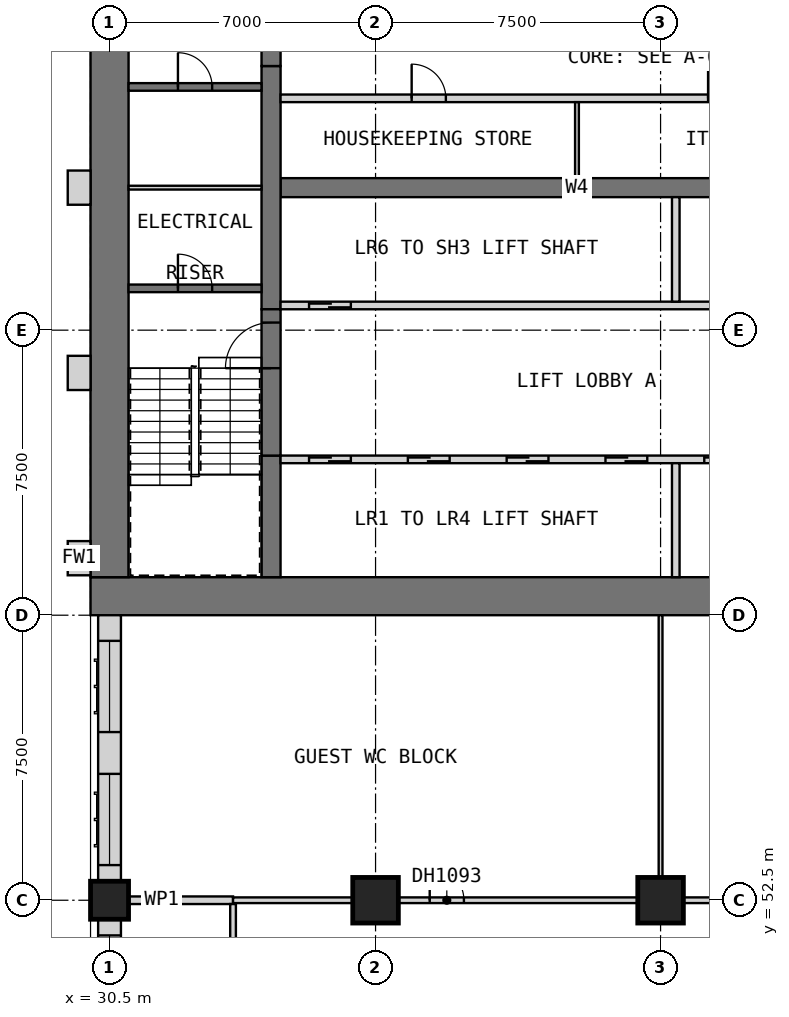
"""IFC4 building model, lengths in metres.
Left out: names, types, materials, properties, quantities, classifications, styles, units other than length and angle.
Written with IfcOpenShell. Run it as: python <this file> out.ifc"""

import sys

from ifc_helpers import new_model, si_unit, direction, frame, frame_2d, origin, origin_2d, place, context, subcontext, project, spatial, rectangle, extrude, element, fill, save


model = new_model("IFC4")
c1 = context("Model", 3, precision=1e-05, world=origin(), true_north=direction((0.0, 1.0)))
c2 = subcontext(c1, "Body", "Model", "MODEL_VIEW")
j1 = project(units=[si_unit("LENGTHUNIT", "METRE"), si_unit("PLANEANGLEUNIT", "RADIAN")], contexts=[c1])
p1 = place(None, origin())
s1 = spatial("IfcSite", under=j1, at=p1, CompositionType="ELEMENT")
p2 = place(p1, origin())
s2 = spatial("IfcBuilding", under=s1, at=p2, CompositionType="ELEMENT")
p3 = place(p2, frame((0.0, 0.0, 34.0)))
s3 = spatial("IfcBuildingStorey", under=s2, at=p3, CompositionType="ELEMENT", Elevation=34.0)
p4 = place(p3, frame((30.5, 52.5, 0.0), z_axis=(0.0, 0.0, 1.0), x_axis=(1.0, 0.0, 0.0)))
e1 = element("IfcColumn", 1, at=p4, inside=s3, PredefinedType="COLUMN", context=c2, shape_type="SweptSolid", body=[
    extrude(rectangle(XDim=1.0, YDim=1.0, at=origin_2d()), origin(), (0.0, 0.0, 1.0), 3.6),
])
for number, where, z_axis, x_axis in (
    (2, (37.5, 52.5, 0.0), (0.0, 0.0, 1.0), (1.0, 0.0, 0.0)),
    (3, (45.0, 52.5, 0.0), (0.0, 0.0, 1.0), (1.0, 0.0, 0.0)),
):
    element("IfcColumn", number, at=place(p3, frame(where, z_axis=z_axis, x_axis=x_axis)), inside=s3, PredefinedType="COLUMN", context=c2, shape_type="SweptSolid", body=[
        extrude(rectangle(XDim=1.2, YDim=1.2, at=origin_2d()), origin(), (0.0, 0.0, 1.0), 3.6),
    ])
p5 = place(p3, frame((30.0, 60.5, 0.0), z_axis=(0.0, 0.0, 1.0), x_axis=(1.0, 0.0, 0.0)))
e4 = element("IfcWall", 4, at=p5, inside=s3, PredefinedType="SHEAR", context=c2, shape_type="SweptSolid", body=[
    extrude(rectangle(XDim=30.0, YDim=1.0, at=frame_2d((15.0, 0.0))), origin(), (0.0, 0.0, 1.0), 3.6),
])
p6 = place(p5, frame((21.9, 0.0, 0.0)))
e5 = element("IfcOpeningElement", 5, at=p6, cuts=e4, PredefinedType="OPENING", context=c2, shape_type="SweptSolid", body=[
    extrude(rectangle(XDim=1.8, YDim=2.1, at=frame_2d((0.9, 1.05))), frame((0.0, 0.51, 0.0), z_axis=(0.0, -1.0, 0.0), x_axis=(1.0, 0.0, 0.0)), (0.0, 0.0, 1.0), 1.02),
])
p7 = place(p5, frame((26.5, 0.0, 0.0)))
e6 = element("IfcOpeningElement", 6, at=p7, cuts=e4, PredefinedType="OPENING", context=c2, shape_type="SweptSolid", body=[
    extrude(rectangle(XDim=1.2, YDim=2.1, at=frame_2d((0.6, 1.05))), frame((0.0, 0.51, 0.0), z_axis=(0.0, -1.0, 0.0), x_axis=(1.0, 0.0, 0.0)), (0.0, 0.0, 1.0), 1.02),
])
p8 = place(p3, frame((30.5, 61.0, 0.0), z_axis=(0.0, 0.0, 1.0), x_axis=(0.0, 1.0, 0.0)))
e7 = element("IfcWall", 7, at=p8, inside=s3, PredefinedType="SHEAR", context=c2, shape_type="SweptSolid", body=[
    extrude(rectangle(XDim=20.5, YDim=1.0, at=frame_2d((10.25, 0.0))), origin(), (0.0, 0.0, 1.0), 3.6),
])
p9 = place(p3, frame((35.0, 71.25, 0.0), z_axis=(0.0, 0.0, 1.0), x_axis=(1.0, 0.0, 0.0)))
e8 = element("IfcWall", 8, at=p9, inside=s3, PredefinedType="SHEAR", context=c2, shape_type="SweptSolid", body=[
    extrude(rectangle(XDim=15.6, YDim=0.5, at=frame_2d((7.8, 0.0))), origin(), (0.0, 0.0, 1.0), 3.6),
])
p10 = place(p3, frame((34.75, 61.0, 0.0), z_axis=(0.0, 0.0, 1.0), x_axis=(0.0, 1.0, 0.0)))
e9 = element("IfcWall", 9, at=p10, inside=s3, PredefinedType="SHEAR", context=c2, shape_type="SweptSolid", body=[
    extrude(rectangle(XDim=3.2, YDim=0.5, at=frame_2d((1.6, 0.0))), origin(), (0.0, 0.0, 1.0), 3.6),
])
p11 = place(p3, frame((34.75, 68.05, 0.0), z_axis=(0.0, 0.0, 1.0), x_axis=(0.0, 1.0, 0.0)))
e10 = element("IfcWall", 10, at=p11, inside=s3, PredefinedType="SHEAR", context=c2, shape_type="SweptSolid", body=[
    extrude(rectangle(XDim=6.4, YDim=0.5, at=frame_2d((3.2, 0.0))), origin(), (0.0, 0.0, 1.0), 3.6),
])
for number, where, z_axis, x_axis in (
    (11, (29.7, 61.05, 0.0), (0.0, 0.0, 1.0), (0.0, 1.0, 0.0)),
    (12, (29.7, 65.925, 0.0), (0.0, 0.0, 1.0), (0.0, 1.0, 0.0)),
    (13, (29.7, 70.8, 0.0), (0.0, 0.0, 1.0), (0.0, 1.0, 0.0)),
):
    element("IfcWall", number, at=place(p3, frame(where, z_axis=z_axis, x_axis=x_axis)), inside=s3, PredefinedType="SOLIDWALL", context=c2, shape_type="SweptSolid", body=[
        extrude(rectangle(XDim=0.9, YDim=0.6, at=frame_2d((0.45, 0.0))), origin(), (0.0, 0.0, 1.0), 286.2),
    ])
p12 = place(p3, frame((30.5, 60.0, 0.0), z_axis=(0.0, 0.0, 1.0), x_axis=(0.0, -1.0, 0.0)))
e14 = element("IfcWall", 14, at=p12, inside=s3, PredefinedType="SOLIDWALL", context=c2, shape_type="SweptSolid", body=[
    extrude(rectangle(XDim=7.0, YDim=0.6, at=frame_2d((3.5, 0.0))), origin(), (0.0, 0.0, 1.0), 3.35),
])
p13 = place(p12, frame((4.175, 0.0, 0.8)))
e15 = element("IfcOpeningElement", 15, at=p13, cuts=e14, PredefinedType="OPENING", context=c2, shape_type="SweptSolid", body=[
    extrude(rectangle(XDim=2.4, YDim=1.8, at=frame_2d((1.2, 0.9))), frame((0.0, 0.31, 0.0), z_axis=(0.0, -1.0, 0.0), x_axis=(1.0, 0.0, 0.0)), (0.0, 0.0, 1.0), 0.62),
])
p14 = place(p12, frame((0.675, 0.0, 0.8)))
e16 = element("IfcOpeningElement", 16, at=p14, cuts=e14, PredefinedType="OPENING", context=c2, shape_type="SweptSolid", body=[
    extrude(rectangle(XDim=2.4, YDim=1.8, at=frame_2d((1.2, 0.9))), frame((0.0, 0.31, 0.0), z_axis=(0.0, -1.0, 0.0), x_axis=(1.0, 0.0, 0.0)), (0.0, 0.0, 1.0), 0.62),
])
p15 = place(p3, frame((30.5, 52.0, 0.0), z_axis=(0.0, 0.0, 1.0), x_axis=(0.0, -1.0, 0.0)))
e17 = element("IfcWall", 17, at=p15, inside=s3, PredefinedType="SOLIDWALL", context=c2, shape_type="SweptSolid", body=[
    extrude(rectangle(XDim=6.0, YDim=0.6, at=frame_2d((3.0, 0.0))), origin(), (0.0, 0.0, 1.0), 2.85),
])
p16 = place(p15, frame((3.425, 0.0, 0.8)))
e18 = element("IfcOpeningElement", 18, at=p16, cuts=e17, PredefinedType="OPENING", context=c2, shape_type="SweptSolid", body=[
    extrude(rectangle(XDim=2.4, YDim=1.8, at=frame_2d((1.2, 0.9))), frame((0.0, 0.31, 0.0), z_axis=(0.0, -1.0, 0.0), x_axis=(1.0, 0.0, 0.0)), (0.0, 0.0, 1.0), 0.62),
])
p17 = place(p15, frame((0.425, 0.0, 0.8)))
e19 = element("IfcOpeningElement", 19, at=p17, cuts=e17, PredefinedType="OPENING", context=c2, shape_type="SweptSolid", body=[
    extrude(rectangle(XDim=2.4, YDim=1.8, at=frame_2d((1.2, 0.9))), frame((0.0, 0.31, 0.0), z_axis=(0.0, -1.0, 0.0), x_axis=(1.0, 0.0, 0.0)), (0.0, 0.0, 1.0), 0.62),
])
p18 = place(p3, frame((35.0, 64.1, 0.0), z_axis=(0.0, 0.0, 1.0), x_axis=(1.0, 0.0, 0.0)))
e20 = element("IfcWall", 20, at=p18, inside=s3, PredefinedType="SOLIDWALL", context=c2, shape_type="SweptSolid", body=[
    extrude(rectangle(XDim=13.0, YDim=0.2, at=frame_2d((6.5, 0.0))), origin(), (0.0, 0.0, 1.0), 3.6),
])
p19 = place(p18, frame((0.75, 0.0, 0.0)))
e21 = element("IfcOpeningElement", 21, at=p19, cuts=e20, PredefinedType="OPENING", context=c2, shape_type="SweptSolid", body=[
    extrude(rectangle(XDim=1.1, YDim=2.1, at=frame_2d((0.55, 1.05))), frame((0.0, 0.11, 0.0), z_axis=(0.0, -1.0, 0.0), x_axis=(1.0, 0.0, 0.0)), (0.0, 0.0, 1.0), 0.22),
])
p20 = place(p18, frame((3.35, 0.0, 0.0)))
e22 = element("IfcOpeningElement", 22, at=p20, cuts=e20, PredefinedType="OPENING", context=c2, shape_type="SweptSolid", body=[
    extrude(rectangle(XDim=1.1, YDim=2.1, at=frame_2d((0.55, 1.05))), frame((0.0, 0.11, 0.0), z_axis=(0.0, -1.0, 0.0), x_axis=(1.0, 0.0, 0.0)), (0.0, 0.0, 1.0), 0.22),
])
p21 = place(p18, frame((5.95, 0.0, 0.0)))
e23 = element("IfcOpeningElement", 23, at=p21, cuts=e20, PredefinedType="OPENING", context=c2, shape_type="SweptSolid", body=[
    extrude(rectangle(XDim=1.1, YDim=2.1, at=frame_2d((0.55, 1.05))), frame((0.0, 0.11, 0.0), z_axis=(0.0, -1.0, 0.0), x_axis=(1.0, 0.0, 0.0)), (0.0, 0.0, 1.0), 0.22),
])
p22 = place(p18, frame((8.55, 0.0, 0.0)))
e24 = element("IfcOpeningElement", 24, at=p22, cuts=e20, PredefinedType="OPENING", context=c2, shape_type="SweptSolid", body=[
    extrude(rectangle(XDim=1.1, YDim=2.1, at=frame_2d((0.55, 1.05))), frame((0.0, 0.11, 0.0), z_axis=(0.0, -1.0, 0.0), x_axis=(1.0, 0.0, 0.0)), (0.0, 0.0, 1.0), 0.22),
])
p23 = place(p18, frame((11.15, 0.0, 0.0)))
e25 = element("IfcOpeningElement", 25, at=p23, cuts=e20, PredefinedType="OPENING", context=c2, shape_type="SweptSolid", body=[
    extrude(rectangle(XDim=1.1, YDim=2.1, at=frame_2d((0.55, 1.05))), frame((0.0, 0.11, 0.0), z_axis=(0.0, -1.0, 0.0), x_axis=(1.0, 0.0, 0.0)), (0.0, 0.0, 1.0), 0.22),
])
p24 = place(p3, frame((45.4, 61.0, 0.0), z_axis=(0.0, 0.0, 1.0), x_axis=(0.0, 1.0, 0.0)))
e26 = element("IfcWall", 26, at=p24, inside=s3, PredefinedType="SOLIDWALL", context=c2, shape_type="SweptSolid", body=[
    extrude(rectangle(XDim=3.0, YDim=0.2, at=frame_2d((1.5, 0.0))), origin(), (0.0, 0.0, 1.0), 3.6),
])
p25 = place(p3, frame((35.0, 68.15, 0.0), z_axis=(0.0, 0.0, 1.0), x_axis=(1.0, 0.0, 0.0)))
e27 = element("IfcWall", 27, at=p25, inside=s3, PredefinedType="SOLIDWALL", context=c2, shape_type="SweptSolid", body=[
    extrude(rectangle(XDim=13.0, YDim=0.2, at=frame_2d((6.5, 0.0))), origin(), (0.0, 0.0, 1.0), 3.6),
])
p26 = place(p25, frame((0.75, 0.0, 0.0)))
e28 = element("IfcOpeningElement", 28, at=p26, cuts=e27, PredefinedType="OPENING", context=c2, shape_type="SweptSolid", body=[
    extrude(rectangle(XDim=1.1, YDim=2.1, at=frame_2d((0.55, 1.05))), frame((0.0, 0.11, 0.0), z_axis=(0.0, -1.0, 0.0), x_axis=(1.0, 0.0, 0.0)), (0.0, 0.0, 1.0), 0.22),
])
p27 = place(p3, frame((45.4, 68.25, 0.0), z_axis=(0.0, 0.0, 1.0), x_axis=(0.0, 1.0, 0.0)))
e29 = element("IfcWall", 29, at=p27, inside=s3, PredefinedType="SOLIDWALL", context=c2, shape_type="SweptSolid", body=[
    extrude(rectangle(XDim=2.75, YDim=0.2, at=frame_2d((1.375, 0.0))), origin(), (0.0, 0.0, 1.0), 3.6),
])
p28 = place(p3, frame((35.0, 73.6, 0.0), z_axis=(0.0, 0.0, 1.0), x_axis=(1.0, 0.0, 0.0)))
e30 = element("IfcWall", 30, at=p28, inside=s3, PredefinedType="PARTITIONING", context=c2, shape_type="SweptSolid", body=[
    extrude(rectangle(XDim=15.6, YDim=0.2, at=frame_2d((7.8, 0.0))), origin(), (0.0, 0.0, 1.0), 3.35),
])
p29 = place(p28, frame((3.45, 0.0, 0.0)))
e31 = element("IfcOpeningElement", 31, at=p29, cuts=e30, PredefinedType="OPENING", context=c2, shape_type="SweptSolid", body=[
    extrude(rectangle(XDim=0.9, YDim=2.1, at=frame_2d((0.45, 1.05))), frame((0.0, 0.11, 0.0), z_axis=(0.0, -1.0, 0.0), x_axis=(1.0, 0.0, 0.0)), (0.0, 0.0, 1.0), 0.22),
])
p30 = place(p28, frame((11.25, 0.0, 0.0)))
e32 = element("IfcOpeningElement", 32, at=p30, cuts=e30, PredefinedType="OPENING", context=c2, shape_type="SweptSolid", body=[
    extrude(rectangle(XDim=0.9, YDim=2.1, at=frame_2d((0.45, 1.05))), frame((0.0, 0.11, 0.0), z_axis=(0.0, -1.0, 0.0), x_axis=(1.0, 0.0, 0.0)), (0.0, 0.0, 1.0), 0.22),
])
p31 = place(p3, frame((42.8, 71.5, 0.0), z_axis=(0.0, 0.0, 1.0), x_axis=(0.0, 1.0, 0.0)))
e33 = element("IfcWall", 33, at=p31, inside=s3, PredefinedType="PARTITIONING", context=c2, shape_type="SweptSolid", body=[
    extrude(rectangle(XDim=2.0, YDim=0.1, at=frame_2d((1.0, 0.0))), origin(), (0.0, 0.0, 1.0), 3.35),
])
p32 = place(p3, frame((34.75, 64.2, 0.0), z_axis=(0.0, 0.0, 1.0), x_axis=(0.0, 1.0, 0.0)))
e34 = element("IfcWall", 34, at=p32, inside=s3, PredefinedType="SOLIDWALL", context=c2, shape_type="SweptSolid", body=[
    extrude(rectangle(XDim=3.85, YDim=0.5, at=frame_2d((1.925, 0.0))), origin(), (0.0, 0.0, 1.0), 2.4),
])
p33 = place(p32, frame((2.3, 0.0, 0.0)))
e35 = element("IfcOpeningElement", 35, at=p33, cuts=e34, PredefinedType="OPENING", context=c2, shape_type="SweptSolid", body=[
    extrude(rectangle(XDim=1.2, YDim=2.1, at=frame_2d((0.6, 1.05))), frame((0.0, 0.26, 0.0), z_axis=(0.0, -1.0, 0.0), x_axis=(1.0, 0.0, 0.0)), (0.0, 0.0, 1.0), 0.52),
])
p34 = place(p3, frame((34.75, 74.45, 0.0), z_axis=(0.0, 0.0, 1.0), x_axis=(0.0, 1.0, 0.0)))
e36 = element("IfcWall", 36, at=p34, inside=s3, PredefinedType="SOLIDWALL", context=c2, shape_type="SweptSolid", body=[
    extrude(rectangle(XDim=3.85, YDim=0.5, at=frame_2d((1.925, 0.0))), origin(), (0.0, 0.0, 1.0), 2.4),
])
p35 = place(p34, frame((1.0, 0.0, 0.0)))
e37 = element("IfcOpeningElement", 37, at=p35, cuts=e36, PredefinedType="OPENING", context=c2, shape_type="SweptSolid", body=[
    extrude(rectangle(XDim=1.2, YDim=2.1, at=frame_2d((0.6, 1.05))), frame((0.0, 0.26, 0.0), z_axis=(0.0, -1.0, 0.0), x_axis=(1.0, 0.0, 0.0)), (0.0, 0.0, 1.0), 0.52),
])
p36 = place(p3, frame((31.0, 68.6, 0.0), z_axis=(0.0, 0.0, 1.0), x_axis=(1.0, 0.0, 0.0)))
e38 = element("IfcWall", 38, at=p36, inside=s3, PredefinedType="SOLIDWALL", context=c2, shape_type="SweptSolid", body=[
    extrude(rectangle(XDim=3.5, YDim=0.2, at=frame_2d((1.75, 0.0))), origin(), (0.0, 0.0, 1.0), 3.35),
])
p37 = place(p36, frame((1.3, 0.0, 0.0)))
e39 = element("IfcOpeningElement", 39, at=p37, cuts=e38, PredefinedType="OPENING", context=c2, shape_type="SweptSolid", body=[
    extrude(rectangle(XDim=0.9, YDim=2.1, at=frame_2d((0.45, 1.05))), frame((0.0, 0.11, 0.0), z_axis=(0.0, -1.0, 0.0), x_axis=(1.0, 0.0, 0.0)), (0.0, 0.0, 1.0), 0.22),
])
p38 = place(p3, frame((31.0, 73.9, 0.0), z_axis=(0.0, 0.0, 1.0), x_axis=(1.0, 0.0, 0.0)))
e40 = element("IfcWall", 40, at=p38, inside=s3, PredefinedType="SOLIDWALL", context=c2, shape_type="SweptSolid", body=[
    extrude(rectangle(XDim=3.5, YDim=0.2, at=frame_2d((1.75, 0.0))), origin(), (0.0, 0.0, 1.0), 3.35),
])
p39 = place(p38, frame((1.3, 0.0, 0.0)))
e41 = element("IfcOpeningElement", 41, at=p39, cuts=e40, PredefinedType="OPENING", context=c2, shape_type="SweptSolid", body=[
    extrude(rectangle(XDim=0.9, YDim=2.1, at=frame_2d((0.45, 1.05))), frame((0.0, 0.11, 0.0), z_axis=(0.0, -1.0, 0.0), x_axis=(1.0, 0.0, 0.0)), (0.0, 0.0, 1.0), 0.22),
])
p40 = place(p3, frame((31.0, 71.25, 0.0), z_axis=(0.0, 0.0, 1.0), x_axis=(1.0, 0.0, 0.0)))
e42 = element("IfcWall", 42, at=p40, inside=s3, PredefinedType="PARTITIONING", context=c2, shape_type="SweptSolid", body=[
    extrude(rectangle(XDim=3.5, YDim=0.1, at=frame_2d((1.75, 0.0))), origin(), (0.0, 0.0, 1.0), 3.35),
])
p41 = place(p3, frame((30.0, 52.5, 0.0), z_axis=(0.0, 0.0, 1.0), x_axis=(1.0, 0.0, 0.0)))
e43 = element("IfcWall", 43, at=p41, inside=s3, PredefinedType="PARTITIONING", context=c2, shape_type="SweptSolid", body=[
    extrude(rectangle(XDim=3.75, YDim=0.2, at=frame_2d((1.875, 0.0))), origin(), (0.0, 0.0, 1.0), 3.35),
])
p42 = place(p3, frame((33.75, 52.5, 0.0), z_axis=(0.0, 0.0, 1.0), x_axis=(1.0, 0.0, 0.0)))
e44 = element("IfcWall", 44, at=p42, inside=s3, PredefinedType="PARTITIONING", context=c2, shape_type="SweptSolid", body=[
    extrude(rectangle(XDim=17.15, YDim=0.15, at=frame_2d((8.575, 0.0))), origin(), (0.0, 0.0, 1.0), 3.35),
])
p43 = place(p42, frame((5.175, 0.0, 0.0)))
e45 = element("IfcOpeningElement", 45, at=p43, cuts=e44, PredefinedType="OPENING", context=c2, shape_type="SweptSolid", body=[
    extrude(rectangle(XDim=0.9, YDim=2.1, at=frame_2d((0.45, 1.05))), frame((0.0, 0.085, 0.0), z_axis=(0.0, -1.0, 0.0), x_axis=(1.0, 0.0, 0.0)), (0.0, 0.0, 1.0), 0.17),
])
p44 = place(p42, frame((13.75, 0.0, 0.0)))
e46 = element("IfcOpeningElement", 46, at=p44, cuts=e44, PredefinedType="OPENING", context=c2, shape_type="SweptSolid", body=[
    extrude(rectangle(XDim=0.9, YDim=2.1, at=frame_2d((0.45, 1.05))), frame((0.0, 0.085, 0.0), z_axis=(0.0, -1.0, 0.0), x_axis=(1.0, 0.0, 0.0)), (0.0, 0.0, 1.0), 0.17),
])
p45 = place(p3, frame((33.75, 50.175, 0.0), z_axis=(0.0, 0.0, 1.0), x_axis=(0.0, 1.0, 0.0)))
e47 = element("IfcWall", 47, at=p45, inside=s3, PredefinedType="PARTITIONING", context=c2, shape_type="SweptSolid", body=[
    extrude(rectangle(XDim=2.225, YDim=0.15, at=frame_2d((1.112, 0.0))), origin(), (0.0, 0.0, 1.0), 3.35),
])
p46 = place(p3, frame((45.0, 52.575, 0.0), z_axis=(0.0, 0.0, 1.0), x_axis=(0.0, 1.0, 0.0)))
e48 = element("IfcWall", 48, at=p46, inside=s3, PredefinedType="PARTITIONING", context=c2, shape_type="SweptSolid", body=[
    extrude(rectangle(XDim=7.425, YDim=0.1, at=frame_2d((3.712, 0.0))), origin(), (0.0, 0.0, 1.0), 3.35),
])
p47 = place(p13, origin())
e49 = element("IfcWindow", 49, at=p47, inside=s3, PartitioningType="SINGLE_PANEL", PredefinedType="WINDOW", context=c2, shape_type="SweptSolid", body=[
    extrude(rectangle(XDim=2.4, YDim=1.8, at=frame_2d((1.2, 0.9))), frame((0.0, -0.07, 0.0), z_axis=(0.0, -1.0, 0.0), x_axis=(1.0, 0.0, 0.0)), (0.0, 0.0, 1.0), 0.06),
])
fill(e15, e49)
p48 = place(p14, origin())
e50 = element("IfcWindow", 50, at=p48, inside=s3, PartitioningType="SINGLE_PANEL", PredefinedType="WINDOW", context=c2, shape_type="SweptSolid", body=[
    extrude(rectangle(XDim=2.4, YDim=1.8, at=frame_2d((1.2, 0.9))), frame((0.0, -0.07, 0.0), z_axis=(0.0, -1.0, 0.0), x_axis=(1.0, 0.0, 0.0)), (0.0, 0.0, 1.0), 0.06),
])
fill(e16, e50)
p49 = place(p17, origin())
e51 = element("IfcWindow", 51, at=p49, inside=s3, PartitioningType="SINGLE_PANEL", PredefinedType="WINDOW", context=c2, shape_type="SweptSolid", body=[
    extrude(rectangle(XDim=2.4, YDim=1.8, at=frame_2d((1.2, 0.9))), frame((0.0, -0.07, 0.0), z_axis=(0.0, -1.0, 0.0), x_axis=(1.0, 0.0, 0.0)), (0.0, 0.0, 1.0), 0.06),
])
fill(e19, e51)
p50 = place(p19, origin())
e52 = element("IfcDoor", 52, at=p50, inside=s3, OperationType="DOUBLE_DOOR_SLIDING", PredefinedType="DOOR", context=c2, shape_type="SweptSolid", body=[
    extrude(rectangle(XDim=1.1, YDim=2.1, at=frame_2d((0.55, 1.05))), frame((0.0, 0.025, 0.0), z_axis=(0.0, -1.0, 0.0), x_axis=(1.0, 0.0, 0.0)), (0.0, 0.0, 1.0), 0.05),
])
fill(e21, e52)
p51 = place(p20, origin())
e53 = element("IfcDoor", 53, at=p51, inside=s3, OperationType="DOUBLE_DOOR_SLIDING", PredefinedType="DOOR", context=c2, shape_type="SweptSolid", body=[
    extrude(rectangle(XDim=1.1, YDim=2.1, at=frame_2d((0.55, 1.05))), frame((0.0, 0.025, 0.0), z_axis=(0.0, -1.0, 0.0), x_axis=(1.0, 0.0, 0.0)), (0.0, 0.0, 1.0), 0.05),
])
fill(e22, e53)
p52 = place(p21, origin())
e54 = element("IfcDoor", 54, at=p52, inside=s3, OperationType="DOUBLE_DOOR_SLIDING", PredefinedType="DOOR", context=c2, shape_type="SweptSolid", body=[
    extrude(rectangle(XDim=1.1, YDim=2.1, at=frame_2d((0.55, 1.05))), frame((0.0, 0.025, 0.0), z_axis=(0.0, -1.0, 0.0), x_axis=(1.0, 0.0, 0.0)), (0.0, 0.0, 1.0), 0.05),
])
fill(e23, e54)
p53 = place(p22, origin())
e55 = element("IfcDoor", 55, at=p53, inside=s3, OperationType="DOUBLE_DOOR_SLIDING", PredefinedType="DOOR", context=c2, shape_type="SweptSolid", body=[
    extrude(rectangle(XDim=1.1, YDim=2.1, at=frame_2d((0.55, 1.05))), frame((0.0, 0.025, 0.0), z_axis=(0.0, -1.0, 0.0), x_axis=(1.0, 0.0, 0.0)), (0.0, 0.0, 1.0), 0.05),
])
fill(e24, e55)
p54 = place(p23, origin())
e56 = element("IfcDoor", 56, at=p54, inside=s3, OperationType="DOUBLE_DOOR_SLIDING", PredefinedType="DOOR", context=c2, shape_type="SweptSolid", body=[
    extrude(rectangle(XDim=1.1, YDim=2.1, at=frame_2d((0.55, 1.05))), frame((0.0, 0.025, 0.0), z_axis=(0.0, -1.0, 0.0), x_axis=(1.0, 0.0, 0.0)), (0.0, 0.0, 1.0), 0.05),
])
fill(e25, e56)
p55 = place(p26, origin())
e57 = element("IfcDoor", 57, at=p55, inside=s3, OperationType="DOUBLE_DOOR_SLIDING", PredefinedType="DOOR", context=c2, shape_type="SweptSolid", body=[
    extrude(rectangle(XDim=1.1, YDim=2.1, at=frame_2d((0.55, 1.05))), frame((0.0, 0.025, 0.0), z_axis=(0.0, -1.0, 0.0), x_axis=(1.0, 0.0, 0.0)), (0.0, 0.0, 1.0), 0.05),
])
fill(e28, e57)
p56 = place(p29, origin())
e58 = element("IfcDoor", 58, at=p56, inside=s3, OperationType="SINGLE_SWING_RIGHT", PredefinedType="DOOR", context=c2, shape_type="SweptSolid", body=[
    extrude(rectangle(XDim=0.9, YDim=2.1, at=frame_2d((0.45, 1.05))), frame((0.0, 0.025, 0.0), z_axis=(0.0, -1.0, 0.0), x_axis=(1.0, 0.0, 0.0)), (0.0, 0.0, 1.0), 0.05),
])
fill(e31, e58)
p57 = place(p30, origin())
e59 = element("IfcDoor", 59, at=p57, inside=s3, OperationType="SINGLE_SWING_LEFT", PredefinedType="DOOR", context=c2, shape_type="SweptSolid", body=[
    extrude(rectangle(XDim=0.9, YDim=2.1, at=frame_2d((0.45, 1.05))), frame((0.0, 0.025, 0.0), z_axis=(0.0, -1.0, 0.0), x_axis=(1.0, 0.0, 0.0)), (0.0, 0.0, 1.0), 0.05),
])
fill(e32, e59)
p58 = place(p33, origin())
e60 = element("IfcDoor", 60, at=p58, inside=s3, OperationType="SINGLE_SWING_LEFT", PredefinedType="DOOR", context=c2, shape_type="SweptSolid", body=[
    extrude(rectangle(XDim=1.2, YDim=2.1, at=frame_2d((0.6, 1.05))), frame((0.0, 0.025, 0.0), z_axis=(0.0, -1.0, 0.0), x_axis=(1.0, 0.0, 0.0)), (0.0, 0.0, 1.0), 0.05),
])
fill(e35, e60)
p59 = place(p37, origin())
e61 = element("IfcDoor", 61, at=p59, inside=s3, OperationType="SINGLE_SWING_LEFT", PredefinedType="DOOR", context=c2, shape_type="SweptSolid", body=[
    extrude(rectangle(XDim=0.9, YDim=2.1, at=frame_2d((0.45, 1.05))), frame((0.0, 0.025, 0.0), z_axis=(0.0, -1.0, 0.0), x_axis=(1.0, 0.0, 0.0)), (0.0, 0.0, 1.0), 0.05),
])
fill(e39, e61)
p60 = place(p39, origin())
e62 = element("IfcDoor", 62, at=p60, inside=s3, OperationType="SINGLE_SWING_RIGHT", PredefinedType="DOOR", context=c2, shape_type="SweptSolid", body=[
    extrude(rectangle(XDim=0.9, YDim=2.1, at=frame_2d((0.45, 1.05))), frame((0.0, 0.025, 0.0), z_axis=(0.0, -1.0, 0.0), x_axis=(1.0, 0.0, 0.0)), (0.0, 0.0, 1.0), 0.05),
])
fill(e41, e62)
p61 = place(p43, origin())
e63 = element("IfcDoor", 63, at=p61, inside=s3, OperationType="SINGLE_SWING_LEFT", PredefinedType="DOOR", context=c2, shape_type="SweptSolid", body=[
    extrude(rectangle(XDim=0.9, YDim=2.1, at=frame_2d((0.45, 1.05))), frame((0.0, 0.025, 0.0), z_axis=(0.0, -1.0, 0.0), x_axis=(1.0, 0.0, 0.0)), (0.0, 0.0, 1.0), 0.05),
])
fill(e45, e63)
save(model, sys.argv[1])
